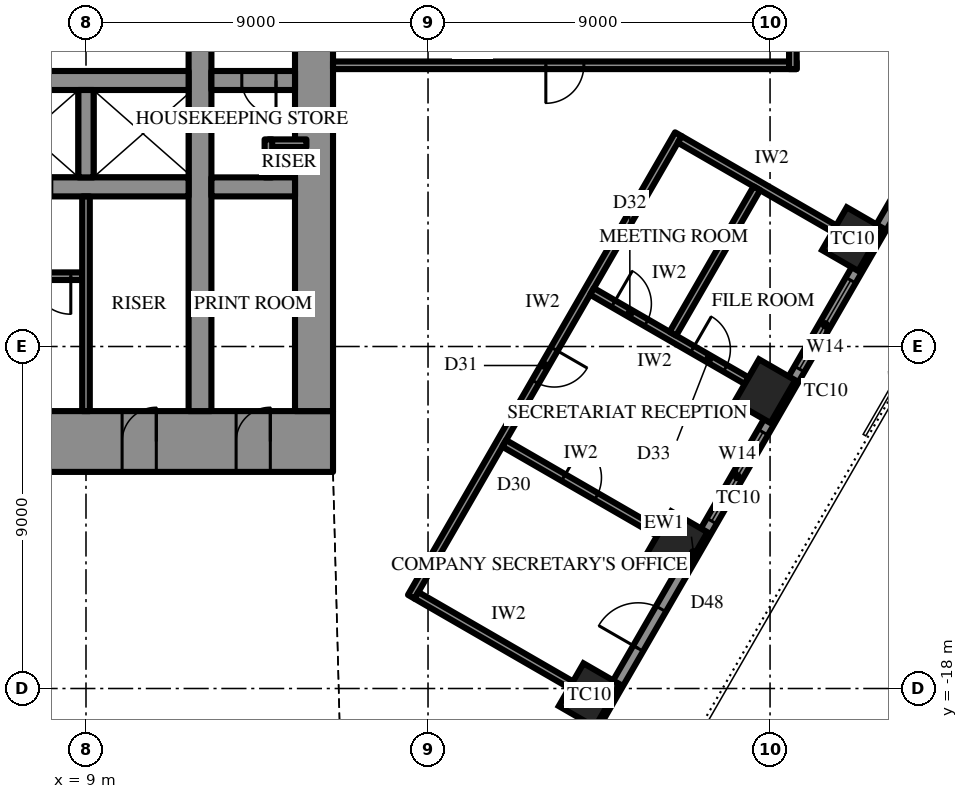
"""IFC4 building model, lengths in metres.
Left out: names, types, materials, properties, quantities, classifications, styles, units other than length and angle.
Written with IfcOpenShell. Run it as: python <this file> out.ifc"""

import sys

from ifc_helpers import new_model, si_unit, direction, frame, frame_2d, origin, origin_2d, place, context, subcontext, project, spatial, rectangle, extrude, element, fill, save


model = new_model("IFC4")
c1 = context("Model", 3, precision=1e-05, world=origin(), true_north=direction((0.0, 1.0)))
c2 = subcontext(c1, "Body", "Model", "MODEL_VIEW")
j1 = project(units=[si_unit("LENGTHUNIT", "METRE"), si_unit("PLANEANGLEUNIT", "RADIAN")], contexts=[c1])
p1 = place(None, origin())
s1 = spatial("IfcSite", under=j1, at=p1, CompositionType="ELEMENT")
p2 = place(p1, origin())
s2 = spatial("IfcBuilding", under=s1, at=p2, CompositionType="ELEMENT")
p3 = place(p2, frame((0.0, 0.0, 249.1)))
s3 = spatial("IfcBuildingStorey", under=s2, at=p3, CompositionType="ELEMENT", Elevation=249.1)
for number, where, z_axis, x_axis in (
    (1, (22.242, -18.175, 0.0), (0.0, 0.0, 1.0), (0.5, 0.866, 0.0)),
    (2, (24.552, -14.175, 0.0), (0.0, 0.0, 1.0), (0.5, 0.866, 0.0)),
    (3, (26.861, -10.175, 0.0), (0.0, 0.0, 1.0), (0.5, 0.866, 0.0)),
    (4, (29.171, -6.175, 0.0), (0.0, 0.0, 1.0), (0.5, 0.866, 0.0)),
):
    element("IfcColumn", number, at=place(p3, frame(where, z_axis=z_axis, x_axis=x_axis)), inside=s3, PredefinedType="COLUMN", context=c2, shape_type="SweptSolid", body=[
        extrude(rectangle(XDim=1.3, YDim=1.1, at=origin_2d()), origin(), (0.0, 0.0, 1.0), 4.2),
    ])
p4 = place(p3, frame((15.5, -11.5, 0.0), z_axis=(0.0, 0.0, 1.0), x_axis=(-1.0, 0.0, 0.0)))
e5 = element("IfcWall", 5, at=p4, inside=s3, PredefinedType="SHEAR", context=c2, shape_type="SweptSolid", body=[
    extrude(rectangle(XDim=31.0, YDim=1.6, at=frame_2d((15.5, 0.0))), origin(), (0.0, 0.0, 1.0), 4.2),
])
p5 = place(p4, frame((16.35, 0.0, 0.0)))
e6 = element("IfcOpeningElement", 6, at=p5, cuts=e5, PredefinedType="OPENING", context=c2, shape_type="SweptSolid", body=[
    extrude(rectangle(XDim=0.9, YDim=2.2, at=frame_2d((0.45, 1.1))), frame((0.0, 0.81, 0.0), z_axis=(0.0, -1.0, 0.0), x_axis=(1.0, 0.0, 0.0)), (0.0, 0.0, 1.0), 1.62),
])
p6 = place(p4, frame((19.35, 0.0, 0.0)))
e7 = element("IfcOpeningElement", 7, at=p6, cuts=e5, PredefinedType="OPENING", context=c2, shape_type="SweptSolid", body=[
    extrude(rectangle(XDim=0.9, YDim=2.2, at=frame_2d((0.45, 1.1))), frame((0.0, 0.81, 0.0), z_axis=(0.0, -1.0, 0.0), x_axis=(1.0, 0.0, 0.0)), (0.0, 0.0, 1.0), 1.62),
])
p7 = place(p4, frame((22.4, 0.0, 0.0)))
e8 = element("IfcOpeningElement", 8, at=p7, cuts=e5, PredefinedType="OPENING", context=c2, shape_type="SweptSolid", body=[
    extrude(rectangle(XDim=1.0, YDim=2.2, at=frame_2d((0.5, 1.1))), frame((0.0, 0.81, 0.0), z_axis=(0.0, -1.0, 0.0), x_axis=(1.0, 0.0, 0.0)), (0.0, 0.0, 1.0), 1.62),
])
p8 = place(p4, frame((1.65, 0.0, 0.0)))
e9 = element("IfcOpeningElement", 9, at=p8, cuts=e5, PredefinedType="OPENING", context=c2, shape_type="SweptSolid", body=[
    extrude(rectangle(XDim=0.9, YDim=2.2, at=frame_2d((0.45, 1.1))), frame((0.0, 0.81, 0.0), z_axis=(0.0, -1.0, 0.0), x_axis=(1.0, 0.0, 0.0)), (0.0, 0.0, 1.0), 1.62),
])
p9 = place(p4, frame((4.65, 0.0, 0.0)))
e10 = element("IfcOpeningElement", 10, at=p9, cuts=e5, PredefinedType="OPENING", context=c2, shape_type="SweptSolid", body=[
    extrude(rectangle(XDim=0.9, YDim=2.2, at=frame_2d((0.45, 1.1))), frame((0.0, 0.81, 0.0), z_axis=(0.0, -1.0, 0.0), x_axis=(1.0, 0.0, 0.0)), (0.0, 0.0, 1.0), 1.62),
])
p10 = place(p4, frame((25.45, 0.0, 0.0)))
e11 = element("IfcOpeningElement", 11, at=p10, cuts=e5, PredefinedType="OPENING", context=c2, shape_type="SweptSolid", body=[
    extrude(rectangle(XDim=0.9, YDim=2.2, at=frame_2d((0.45, 1.1))), frame((0.0, 0.81, 0.0), z_axis=(0.0, -1.0, 0.0), x_axis=(1.0, 0.0, 0.0)), (0.0, 0.0, 1.0), 1.62),
])
p11 = place(p4, frame((28.45, 0.0, 0.0)))
e12 = element("IfcOpeningElement", 12, at=p11, cuts=e5, PredefinedType="OPENING", context=c2, shape_type="SweptSolid", body=[
    extrude(rectangle(XDim=0.9, YDim=2.2, at=frame_2d((0.45, 1.1))), frame((0.0, 0.81, 0.0), z_axis=(0.0, -1.0, 0.0), x_axis=(1.0, 0.0, 0.0)), (0.0, 0.0, 1.0), 1.62),
])
p12 = place(p3, frame((15.0, -10.7, 0.0), z_axis=(0.0, 0.0, 1.0), x_axis=(0.0, 1.0, 0.0)))
e13 = element("IfcWall", 13, at=p12, inside=s3, PredefinedType="SHEAR", context=c2, shape_type="SweptSolid", body=[
    extrude(rectangle(XDim=21.4, YDim=1.0, at=frame_2d((10.7, 0.0))), origin(), (0.0, 0.0, 1.0), 4.2),
])
p13 = place(p12, frame((9.8, 0.0, 0.0)))
e14 = element("IfcOpeningElement", 14, at=p13, cuts=e13, PredefinedType="OPENING", context=c2, shape_type="SweptSolid", body=[
    extrude(rectangle(XDim=1.8, YDim=2.4, at=frame_2d((0.9, 1.2))), frame((0.0, 0.51, 0.0), z_axis=(0.0, -1.0, 0.0), x_axis=(1.0, 0.0, 0.0)), (0.0, 0.0, 1.0), 1.02),
])
p14 = place(p3, frame((12.0, -10.7, 0.0), z_axis=(0.0, 0.0, 1.0), x_axis=(0.0, 1.0, 0.0)))
e15 = element("IfcWall", 15, at=p14, inside=s3, PredefinedType="SHEAR", context=c2, shape_type="SweptSolid", body=[
    extrude(rectangle(XDim=21.4, YDim=0.6, at=frame_2d((10.7, 0.0))), origin(), (0.0, 0.0, 1.0), 4.2),
])
p15 = place(p14, frame((9.8, 0.0, 0.0)))
e16 = element("IfcOpeningElement", 16, at=p15, cuts=e15, PredefinedType="OPENING", context=c2, shape_type="SweptSolid", body=[
    extrude(rectangle(XDim=1.8, YDim=2.4, at=frame_2d((0.9, 1.2))), frame((0.0, 0.31, 0.0), z_axis=(0.0, -1.0, 0.0), x_axis=(1.0, 0.0, 0.0)), (0.0, 0.0, 1.0), 0.62),
])
p16 = place(p3, frame((14.5, -2.0, 0.0), z_axis=(0.0, 0.0, 1.0), x_axis=(-1.0, 0.0, 0.0)))
e17 = element("IfcWall", 17, at=p16, inside=s3, PredefinedType="SHEAR", context=c2, shape_type="SweptSolid", body=[
    extrude(rectangle(XDim=2.2, YDim=0.5, at=frame_2d((1.1, 0.0))), origin(), (0.0, 0.0, 1.0), 4.2),
])
p17 = place(p16, frame((0.5, 0.0, 0.0)))
e18 = element("IfcOpeningElement", 18, at=p17, cuts=e17, PredefinedType="OPENING", context=c2, shape_type="SweptSolid", body=[
    extrude(rectangle(XDim=0.9, YDim=2.2, at=frame_2d((0.45, 1.1))), frame((0.0, 0.26, 0.0), z_axis=(0.0, -1.0, 0.0), x_axis=(1.0, 0.0, 0.0)), (0.0, 0.0, 1.0), 0.52),
])
p18 = place(p3, frame((11.7, -2.0, 0.0), z_axis=(0.0, 0.0, 1.0), x_axis=(-1.0, 0.0, 0.0)))
e19 = element("IfcWall", 19, at=p18, inside=s3, PredefinedType="SHEAR", context=c2, shape_type="SweptSolid", body=[
    extrude(rectangle(XDim=5.9, YDim=0.5, at=frame_2d((2.95, 0.0))), origin(), (0.0, 0.0, 1.0), 4.2),
])
p19 = place(p3, frame((14.5, -4.8, 0.0), z_axis=(0.0, 0.0, 1.0), x_axis=(-1.0, 0.0, 0.0)))
e20 = element("IfcWall", 20, at=p19, inside=s3, PredefinedType="SHEAR", context=c2, shape_type="SweptSolid", body=[
    extrude(rectangle(XDim=2.2, YDim=0.5, at=frame_2d((1.1, 0.0))), origin(), (0.0, 0.0, 1.0), 4.2),
])
p20 = place(p3, frame((11.7, -4.8, 0.0), z_axis=(0.0, 0.0, 1.0), x_axis=(-1.0, 0.0, 0.0)))
e21 = element("IfcWall", 21, at=p20, inside=s3, PredefinedType="SHEAR", context=c2, shape_type="SweptSolid", body=[
    extrude(rectangle(XDim=23.4, YDim=0.5, at=frame_2d((11.7, 0.0))), origin(), (0.0, 0.0, 1.0), 4.2),
])
p21 = place(p20, frame((6.6, 0.0, 0.0)))
e22 = element("IfcOpeningElement", 22, at=p21, cuts=e21, PredefinedType="OPENING", context=c2, shape_type="SweptSolid", body=[
    extrude(rectangle(XDim=1.2, YDim=2.2, at=frame_2d((0.6, 1.1))), frame((0.0, 0.26, 0.0), z_axis=(0.0, -1.0, 0.0), x_axis=(1.0, 0.0, 0.0)), (0.0, 0.0, 1.0), 0.52),
])
p22 = place(p20, frame((3.6, 0.0, 0.0)))
e23 = element("IfcOpeningElement", 23, at=p22, cuts=e21, PredefinedType="OPENING", context=c2, shape_type="SweptSolid", body=[
    extrude(rectangle(XDim=1.2, YDim=2.2, at=frame_2d((0.6, 1.1))), frame((0.0, 0.26, 0.0), z_axis=(0.0, -1.0, 0.0), x_axis=(1.0, 0.0, 0.0)), (0.0, 0.0, 1.0), 0.52),
])
p23 = place(p3, frame((9.0, -2.25, 0.0), z_axis=(0.0, 0.0, 1.0), x_axis=(0.0, -1.0, 0.0)))
e24 = element("IfcWall", 24, at=p23, inside=s3, PredefinedType="SHEAR", context=c2, shape_type="SweptSolid", body=[
    extrude(rectangle(XDim=2.3, YDim=0.4, at=frame_2d((1.15, 0.0))), origin(), (0.0, 0.0, 1.0), 4.2),
])
p24 = place(p3, frame((8.9, -7.15, 0.0), z_axis=(0.0, 0.0, 1.0), x_axis=(-1.0, 0.0, 0.0)))
e25 = element("IfcWall", 25, at=p24, inside=s3, PredefinedType="SHEAR", context=c2, shape_type="SweptSolid", body=[
    extrude(rectangle(XDim=8.6, YDim=0.2, at=frame_2d((4.3, 0.0))), origin(), (0.0, 0.0, 1.0), 4.2),
])
p25 = place(p24, frame((0.3, 0.0, 0.0)))
e26 = element("IfcOpeningElement", 26, at=p25, cuts=e25, PredefinedType="OPENING", context=c2, shape_type="SweptSolid", body=[
    extrude(rectangle(XDim=1.0, YDim=2.2, at=frame_2d((0.5, 1.1))), frame((0.0, 0.11, 0.0), z_axis=(0.0, -1.0, 0.0), x_axis=(1.0, 0.0, 0.0)), (0.0, 0.0, 1.0), 0.22),
])
p26 = place(p3, frame((18.707, -25.299, 0.0), z_axis=(0.0, 0.0, 1.0), x_axis=(0.500000442367, 0.866025148383, 0.0)))
e27 = element("IfcWall", 27, at=p26, inside=s3, PredefinedType="SOLIDWALL", context=c2, shape_type="SweptSolid", body=[
    extrude(rectangle(XDim=25.113, YDim=0.3, at=frame_2d((12.556, 0.0))), origin(), (0.0, 0.0, 1.0), 2.8),
])
p27 = place(p26, frame((4.278, 0.0, 0.6)))
e28 = element("IfcOpeningElement", 28, at=p27, cuts=e27, PredefinedType="OPENING", context=c2, shape_type="SweptSolid", body=[
    extrude(rectangle(XDim=2.7, YDim=1.95, at=frame_2d((1.35, 0.975))), frame((0.0, 0.16, 0.0), z_axis=(0.0, -1.0, 0.0), x_axis=(1.0, 0.0, 0.0)), (0.0, 0.0, 1.0), 0.32),
])
p28 = place(p26, frame((9.647, 0.0, 0.0)))
e29 = element("IfcOpeningElement", 29, at=p28, cuts=e27, PredefinedType="OPENING", context=c2, shape_type="SweptSolid", body=[
    extrude(rectangle(XDim=1.2, YDim=2.4, at=frame_2d((0.6, 1.2))), frame((0.0, 0.16, 0.0), z_axis=(0.0, -1.0, 0.0), x_axis=(1.0, 0.0, 0.0)), (0.0, 0.0, 1.0), 0.32),
])
p29 = place(p26, frame((13.516, 0.0, 0.6)))
e30 = element("IfcOpeningElement", 30, at=p29, cuts=e27, PredefinedType="OPENING", context=c2, shape_type="SweptSolid", body=[
    extrude(rectangle(XDim=2.7, YDim=1.95, at=frame_2d((1.35, 0.975))), frame((0.0, 0.16, 0.0), z_axis=(0.0, -1.0, 0.0), x_axis=(1.0, 0.0, 0.0)), (0.0, 0.0, 1.0), 0.32),
])
p30 = place(p26, frame((18.135, 0.0, 0.6)))
e31 = element("IfcOpeningElement", 31, at=p30, cuts=e27, PredefinedType="OPENING", context=c2, shape_type="SweptSolid", body=[
    extrude(rectangle(XDim=2.7, YDim=1.95, at=frame_2d((1.35, 0.975))), frame((0.0, 0.16, 0.0), z_axis=(0.0, -1.0, 0.0), x_axis=(1.0, 0.0, 0.0)), (0.0, 0.0, 1.0), 0.32),
])
p31 = place(p3, frame((9.0, -5.05, 0.0), z_axis=(0.0, 0.0, 1.0), x_axis=(0.0, -1.0, 0.0)))
e32 = element("IfcWall", 32, at=p31, inside=s3, PredefinedType="PARTITIONING", context=c2, shape_type="SweptSolid", body=[
    extrude(rectangle(XDim=5.65, YDim=0.2, at=frame_2d((2.825, 0.0))), origin(), (0.0, 0.0, 1.0), 4.0),
])
for number, where, z_axis, x_axis in (
    (33, (14.8, -3.65, 0.0), (0.0, 0.0, 1.0), (-1.0, 0.0, 0.0)),
    (34, (13.8, -3.55, 0.0), (0.0, 0.0, 1.0), (0.0, -1.0, 0.0)),
):
    element("IfcWall", number, at=place(p3, frame(where, z_axis=z_axis, x_axis=x_axis)), inside=s3, PredefinedType="PARTITIONING", context=c2, shape_type="SweptSolid", body=[
        extrude(rectangle(XDim=1.0, YDim=0.2, at=frame_2d((0.5, 0.0))), origin(), (0.0, 0.0, 1.0), 4.0),
    ])
p32 = place(p3, frame((17.559, -15.587, 0.0), z_axis=(0.0, 0.0, 1.0), x_axis=(0.500002095642, 0.866024193862, 0.0)))
e35 = element("IfcWall", 35, at=p32, inside=s3, PredefinedType="PARTITIONING", context=c2, shape_type="SweptSolid", body=[
    extrude(rectangle(XDim=14.057, YDim=0.2, at=frame_2d((7.028, 0.0))), origin(), (0.0, 0.0, 1.0), 4.0),
])
p33 = place(p32, frame((6.528, 0.0, 0.0)))
e36 = element("IfcOpeningElement", 36, at=p33, cuts=e35, PredefinedType="OPENING", context=c2, shape_type="SweptSolid", body=[
    extrude(rectangle(XDim=1.0, YDim=2.2, at=frame_2d((0.5, 1.1))), frame((0.0, 0.11, 0.0), z_axis=(0.0, -1.0, 0.0), x_axis=(1.0, 0.0, 0.0)), (0.0, 0.0, 1.0), 0.22),
])
p34 = place(p3, frame((17.696, -15.55, 0.0), z_axis=(0.0, 0.0, 1.0), x_axis=(0.866038532462, -0.499977259774, 0.0)))
e37 = element("IfcWall", 37, at=p34, inside=s3, PredefinedType="PARTITIONING", context=c2, shape_type="SweptSolid", body=[
    extrude(rectangle(XDim=4.7, YDim=0.2, at=frame_2d((2.35, 0.0))), origin(), (0.0, 0.0, 1.0), 3.082),
])
p35 = place(p3, frame((20.005, -11.55, 0.0), z_axis=(0.0, 0.0, 1.0), x_axis=(0.866038532462, -0.499977259774, 0.0)))
e38 = element("IfcWall", 38, at=p35, inside=s3, PredefinedType="PARTITIONING", context=c2, shape_type="SweptSolid", body=[
    extrude(rectangle(XDim=4.7, YDim=0.2, at=frame_2d((2.35, 0.0))), origin(), (0.0, 0.0, 1.0), 3.082),
])
p36 = place(p35, frame((1.8, 0.0, 0.0)))
e39 = element("IfcOpeningElement", 39, at=p36, cuts=e38, PredefinedType="OPENING", context=c2, shape_type="SweptSolid", body=[
    extrude(rectangle(XDim=1.0, YDim=2.2, at=frame_2d((0.5, 1.1))), frame((0.0, 0.11, 0.0), z_axis=(0.0, -1.0, 0.0), x_axis=(1.0, 0.0, 0.0)), (0.0, 0.0, 1.0), 0.22),
])
p37 = place(p3, frame((22.315, -7.55, 0.0), z_axis=(0.0, 0.0, 1.0), x_axis=(0.866038532462, -0.499977259774, 0.0)))
e40 = element("IfcWall", 40, at=p37, inside=s3, PredefinedType="PARTITIONING", context=c2, shape_type="SweptSolid", body=[
    extrude(rectangle(XDim=4.7, YDim=0.2, at=frame_2d((2.35, 0.0))), origin(), (0.0, 0.0, 1.0), 3.082),
])
p38 = place(p37, frame((0.65, 0.0, 0.0)))
e41 = element("IfcOpeningElement", 41, at=p38, cuts=e40, PredefinedType="OPENING", context=c2, shape_type="SweptSolid", body=[
    extrude(rectangle(XDim=1.0, YDim=2.2, at=frame_2d((0.5, 1.1))), frame((0.0, 0.11, 0.0), z_axis=(0.0, -1.0, 0.0), x_axis=(1.0, 0.0, 0.0)), (0.0, 0.0, 1.0), 0.22),
])
p39 = place(p37, frame((3.05, 0.0, 0.0)))
e42 = element("IfcOpeningElement", 42, at=p39, cuts=e40, PredefinedType="OPENING", context=c2, shape_type="SweptSolid", body=[
    extrude(rectangle(XDim=1.0, YDim=2.2, at=frame_2d((0.5, 1.1))), frame((0.0, 0.11, 0.0), z_axis=(0.0, -1.0, 0.0), x_axis=(1.0, 0.0, 0.0)), (0.0, 0.0, 1.0), 0.22),
])
p40 = place(p3, frame((24.624, -3.55, 0.0), z_axis=(0.0, 0.0, 1.0), x_axis=(0.866038532462, -0.499977259774, 0.0)))
e43 = element("IfcWall", 43, at=p40, inside=s3, PredefinedType="PARTITIONING", context=c2, shape_type="SweptSolid", body=[
    extrude(rectangle(XDim=4.7, YDim=0.2, at=frame_2d((2.35, 0.0))), origin(), (0.0, 0.0, 1.0), 3.082),
])
p41 = place(p3, frame((24.443, -8.663, 0.0), z_axis=(0.0, 0.0, 1.0), x_axis=(0.499983916363, 0.866034689477, 0.0)))
e44 = element("IfcWall", 44, at=p41, inside=s3, PredefinedType="PARTITIONING", context=c2, shape_type="SweptSolid", body=[
    extrude(rectangle(XDim=4.419, YDim=0.2, at=frame_2d((2.209, 0.0))), origin(), (0.0, 0.0, 1.0), 4.0),
])
p42 = place(p3, frame((15.5, -1.6, 0.0), z_axis=(0.0, 0.0, 1.0), x_axis=(1.0, 0.0, 0.0)))
e45 = element("IfcWall", 45, at=p42, inside=s3, PredefinedType="PARTITIONING", context=c2, shape_type="SweptSolid", body=[
    extrude(rectangle(XDim=12.2, YDim=0.2, at=frame_2d((6.1, 0.0))), origin(), (0.0, 0.0, 1.0), 4.0),
])
p43 = place(p42, frame((5.6, 0.0, 0.0)))
e46 = element("IfcOpeningElement", 46, at=p43, cuts=e45, PredefinedType="OPENING", context=c2, shape_type="SweptSolid", body=[
    extrude(rectangle(XDim=1.0, YDim=2.2, at=frame_2d((0.5, 1.1))), frame((0.0, 0.11, 0.0), z_axis=(0.0, -1.0, 0.0), x_axis=(1.0, 0.0, 0.0)), (0.0, 0.0, 1.0), 0.22),
])
p44 = place(p3, frame((27.6, -1.7, 0.0), z_axis=(0.0, 0.0, 1.0), x_axis=(0.0, 1.0, 0.0)))
e47 = element("IfcWall", 47, at=p44, inside=s3, PredefinedType="PARTITIONING", context=c2, shape_type="SweptSolid", body=[
    extrude(rectangle(XDim=3.4, YDim=0.2, at=frame_2d((1.7, 0.0))), origin(), (0.0, 0.0, 1.0), 4.0),
])
p45 = place(p44, frame((1.2, 0.0, 0.0)))
e48 = element("IfcOpeningElement", 48, at=p45, cuts=e47, PredefinedType="OPENING", context=c2, shape_type="SweptSolid", body=[
    extrude(rectangle(XDim=1.0, YDim=2.2, at=frame_2d((0.5, 1.1))), frame((0.0, 0.11, 0.0), z_axis=(0.0, -1.0, 0.0), x_axis=(1.0, 0.0, 0.0)), (0.0, 0.0, 1.0), 0.22),
])
p46 = place(p28, origin())
e49 = element("IfcDoor", 49, at=p46, inside=s3, OperationType="SINGLE_SWING_RIGHT", PredefinedType="DOOR", context=c2, shape_type="SweptSolid", body=[
    extrude(rectangle(XDim=1.2, YDim=2.4, at=frame_2d((0.6, 1.2))), frame((0.0, 0.025, 0.0), z_axis=(0.0, -1.0, 0.0), x_axis=(1.0, 0.0, 0.0)), (0.0, 0.0, 1.0), 0.05),
])
fill(e29, e49)
p47 = place(p29, origin())
e50 = element("IfcWindow", 50, at=p47, inside=s3, PartitioningType="SINGLE_PANEL", PredefinedType="WINDOW", context=c2, shape_type="SweptSolid", body=[
    extrude(rectangle(XDim=2.7, YDim=1.95, at=frame_2d((1.35, 0.975))), frame((0.0, 0.03, 0.0), z_axis=(0.0, -1.0, 0.0), x_axis=(1.0, 0.0, 0.0)), (0.0, 0.0, 1.0), 0.06),
])
fill(e30, e50)
p48 = place(p30, origin())
e51 = element("IfcWindow", 51, at=p48, inside=s3, PartitioningType="SINGLE_PANEL", PredefinedType="WINDOW", context=c2, shape_type="SweptSolid", body=[
    extrude(rectangle(XDim=2.7, YDim=1.95, at=frame_2d((1.35, 0.975))), frame((0.0, 0.03, 0.0), z_axis=(0.0, -1.0, 0.0), x_axis=(1.0, 0.0, 0.0)), (0.0, 0.0, 1.0), 0.06),
])
fill(e31, e51)
p49 = place(p25, origin())
e52 = element("IfcDoor", 52, at=p49, inside=s3, OperationType="SINGLE_SWING_RIGHT", PredefinedType="DOOR", context=c2, shape_type="SweptSolid", body=[
    extrude(rectangle(XDim=1.0, YDim=2.2, at=frame_2d((0.5, 1.1))), frame((0.0, 0.025, 0.0), z_axis=(0.0, -1.0, 0.0), x_axis=(1.0, 0.0, 0.0)), (0.0, 0.0, 1.0), 0.05),
])
fill(e26, e52)
p50 = place(p8, frame((0.9, 0.0, 0.0), z_axis=(0.0, 0.0, 1.0), x_axis=(-1.0, 0.0, 0.0)))
e53 = element("IfcDoor", 53, at=p50, inside=s3, OperationType="SINGLE_SWING_LEFT", PredefinedType="DOOR", context=c2, shape_type="SweptSolid", body=[
    extrude(rectangle(XDim=0.9, YDim=2.2, at=frame_2d((0.45, 1.1))), frame((0.0, 0.025, 0.0), z_axis=(0.0, -1.0, 0.0), x_axis=(1.0, 0.0, 0.0)), (0.0, 0.0, 1.0), 0.05),
])
fill(e9, e53)
p51 = place(p9, frame((0.9, 0.0, 0.0), z_axis=(0.0, 0.0, 1.0), x_axis=(-1.0, 0.0, 0.0)))
e54 = element("IfcDoor", 54, at=p51, inside=s3, OperationType="SINGLE_SWING_LEFT", PredefinedType="DOOR", context=c2, shape_type="SweptSolid", body=[
    extrude(rectangle(XDim=0.9, YDim=2.2, at=frame_2d((0.45, 1.1))), frame((0.0, 0.025, 0.0), z_axis=(0.0, -1.0, 0.0), x_axis=(1.0, 0.0, 0.0)), (0.0, 0.0, 1.0), 0.05),
])
fill(e10, e54)
p52 = place(p17, origin())
e55 = element("IfcDoor", 55, at=p52, inside=s3, OperationType="SINGLE_SWING_RIGHT", PredefinedType="DOOR", context=c2, shape_type="SweptSolid", body=[
    extrude(rectangle(XDim=0.9, YDim=2.2, at=frame_2d((0.45, 1.1))), frame((0.0, 0.025, 0.0), z_axis=(0.0, -1.0, 0.0), x_axis=(1.0, 0.0, 0.0)), (0.0, 0.0, 1.0), 0.05),
])
fill(e18, e55)
p53 = place(p36, origin())
e56 = element("IfcDoor", 56, at=p53, inside=s3, OperationType="SINGLE_SWING_RIGHT", PredefinedType="DOOR", context=c2, shape_type="SweptSolid", body=[
    extrude(rectangle(XDim=1.0, YDim=2.2, at=frame_2d((0.5, 1.1))), frame((0.0, 0.025, 0.0), z_axis=(0.0, -1.0, 0.0), x_axis=(1.0, 0.0, 0.0)), (0.0, 0.0, 1.0), 0.05),
])
fill(e39, e56)
p54 = place(p33, frame((1.0, 0.0, 0.0), z_axis=(0.0, 0.0, 1.0), x_axis=(-1.0, 0.0, 0.0)))
e57 = element("IfcDoor", 57, at=p54, inside=s3, OperationType="SINGLE_SWING_RIGHT", PredefinedType="DOOR", context=c2, shape_type="SweptSolid", body=[
    extrude(rectangle(XDim=1.0, YDim=2.2, at=frame_2d((0.5, 1.1))), frame((0.0, 0.025, 0.0), z_axis=(0.0, -1.0, 0.0), x_axis=(1.0, 0.0, 0.0)), (0.0, 0.0, 1.0), 0.05),
])
fill(e36, e57)
p55 = place(p38, origin())
e58 = element("IfcDoor", 58, at=p55, inside=s3, OperationType="SINGLE_SWING_RIGHT", PredefinedType="DOOR", context=c2, shape_type="SweptSolid", body=[
    extrude(rectangle(XDim=1.0, YDim=2.2, at=frame_2d((0.5, 1.1))), frame((0.0, 0.025, 0.0), z_axis=(0.0, -1.0, 0.0), x_axis=(1.0, 0.0, 0.0)), (0.0, 0.0, 1.0), 0.05),
])
fill(e41, e58)
p56 = place(p39, origin())
e59 = element("IfcDoor", 59, at=p56, inside=s3, OperationType="SINGLE_SWING_RIGHT", PredefinedType="DOOR", context=c2, shape_type="SweptSolid", body=[
    extrude(rectangle(XDim=1.0, YDim=2.2, at=frame_2d((0.5, 1.1))), frame((0.0, 0.025, 0.0), z_axis=(0.0, -1.0, 0.0), x_axis=(1.0, 0.0, 0.0)), (0.0, 0.0, 1.0), 0.05),
])
fill(e42, e59)
p57 = place(p43, frame((1.0, 0.0, 0.0), z_axis=(0.0, 0.0, 1.0), x_axis=(-1.0, 0.0, 0.0)))
e60 = element("IfcDoor", 60, at=p57, inside=s3, OperationType="SINGLE_SWING_LEFT", PredefinedType="DOOR", context=c2, shape_type="SweptSolid", body=[
    extrude(rectangle(XDim=1.0, YDim=2.2, at=frame_2d((0.5, 1.1))), frame((0.0, 0.025, 0.0), z_axis=(0.0, -1.0, 0.0), x_axis=(1.0, 0.0, 0.0)), (0.0, 0.0, 1.0), 0.05),
])
fill(e46, e60)
save(model, sys.argv[1])
